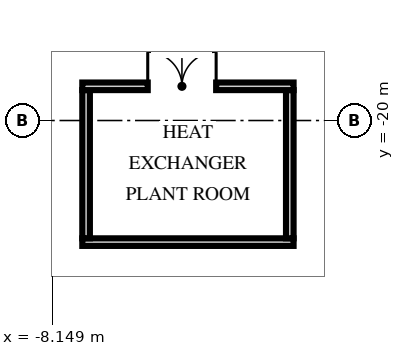
"""IFC4 building model, lengths in metres.
Left out: names, types, materials, properties, quantities, classifications, styles, units other than length and angle.
Written with IfcOpenShell. Run it as: python <this file> out.ifc"""

import sys

from ifc_helpers import new_model, si_unit, direction, frame, frame_2d, origin, origin_2d, place, context, subcontext, project, spatial, rectangle, hollow_rectangle, extrude, element, fill, save


model = new_model("IFC4")
c1 = context("Model", 3, precision=1e-05, world=origin(), true_north=direction((0.0, 1.0)))
c2 = subcontext(c1, "Body", "Model", "MODEL_VIEW")
j1 = project(units=[si_unit("LENGTHUNIT", "METRE"), si_unit("PLANEANGLEUNIT", "RADIAN")], contexts=[c1])
p1 = place(None, origin())
s1 = spatial("IfcSite", under=j1, at=p1, CompositionType="ELEMENT")
p2 = place(p1, origin())
s2 = spatial("IfcBuilding", under=s1, at=p2, CompositionType="ELEMENT")
p3 = place(p2, frame((0.0, 0.0, 192.0)))
s3 = spatial("IfcBuildingStorey", under=s2, at=p3, CompositionType="ELEMENT", Elevation=192.0)
p4 = place(p3, frame((0.0, -27.1, -0.65), z_axis=(0.0, 0.334792284074, 0.942291953974), x_axis=(1.0, 0.0, 0.0)))
e1 = element("IfcColumn", 1, at=p4, inside=s3, PredefinedType="COLUMN", context=c2, shape_type="SweptSolid", body=[
    extrude(hollow_rectangle(XDim=3.2, YDim=1.8, WallThickness=0.2, at=origin_2d()), origin(), (0.0, 0.0, 1.0), 8.065),
])
p5 = place(p3, frame((-9.16, -27.1, -0.65), z_axis=(0.103570687408, 0.332991803119, 0.937224397765), x_axis=(0.994622092871, -0.034607128924, -0.097617821118)))
e2 = element("IfcColumn", 2, at=p5, inside=s3, PredefinedType="COLUMN", context=c2, shape_type="SweptSolid", body=[
    extrude(hollow_rectangle(XDim=3.2, YDim=1.8, WallThickness=0.2, at=origin_2d()), origin(), (0.0, 0.0, 1.0), 8.109),
])
p6 = place(p3, frame((-7.36, -23.2, 0.0), z_axis=(0.0, 0.0, 1.0), x_axis=(1.0, 0.0, 0.0)))
e3 = element("IfcWall", 3, at=p6, inside=s3, PredefinedType="SOLIDWALL", context=c2, shape_type="SweptSolid", body=[
    extrude(rectangle(XDim=5.56, YDim=0.2, at=frame_2d((2.78, 0.0))), origin(), (0.0, 0.0, 1.0), 6.56),
])
for number, where, z_axis, x_axis in (
    (4, (-7.26, -23.1, 0.0), (0.0, 0.0, 1.0), (0.0, 1.0, 0.0)),
    (5, (-1.9, -23.1, 0.0), (0.0, 0.0, 1.0), (0.0, 1.0, 0.0)),
):
    element("IfcWall", number, at=place(p3, frame(where, z_axis=z_axis, x_axis=x_axis)), inside=s3, PredefinedType="SOLIDWALL", context=c2, shape_type="SweptSolid", body=[
        extrude(rectangle(XDim=3.9, YDim=0.2, at=frame_2d((1.95, 0.0))), origin(), (0.0, 0.0, 1.0), 7.25),
    ])
p7 = place(p3, frame((-7.36, -19.1, 0.0), z_axis=(0.0, 0.0, 1.0), x_axis=(1.0, 0.0, 0.0)))
e6 = element("IfcWall", 6, at=p7, inside=s3, PredefinedType="SOLIDWALL", context=c2, shape_type="SweptSolid", body=[
    extrude(rectangle(XDim=5.56, YDim=0.2, at=frame_2d((2.78, 0.0))), origin(), (0.0, 0.0, 1.0), 6.56),
])
p8 = place(p7, frame((1.722, 0.0, 0.0)))
e7 = element("IfcOpeningElement", 7, at=p8, cuts=e6, PredefinedType="OPENING", context=c2, shape_type="SweptSolid", body=[
    extrude(rectangle(XDim=1.8, YDim=2.4, at=frame_2d((0.9, 1.2))), frame((0.0, 0.11, 0.0), z_axis=(0.0, -1.0, 0.0), x_axis=(1.0, 0.0, 0.0)), (0.0, 0.0, 1.0), 0.22),
])
p9 = place(p8, origin())
e8 = element("IfcDoor", 8, at=p9, inside=s3, OperationType="DOUBLE_DOOR_SINGLE_SWING", PredefinedType="DOOR", context=c2, shape_type="SweptSolid", body=[
    extrude(rectangle(XDim=1.8, YDim=2.4, at=frame_2d((0.9, 1.2))), frame((0.0, 0.025, 0.0), z_axis=(0.0, -1.0, 0.0), x_axis=(1.0, 0.0, 0.0)), (0.0, 0.0, 1.0), 0.05),
])
fill(e7, e8)
save(model, sys.argv[1])
